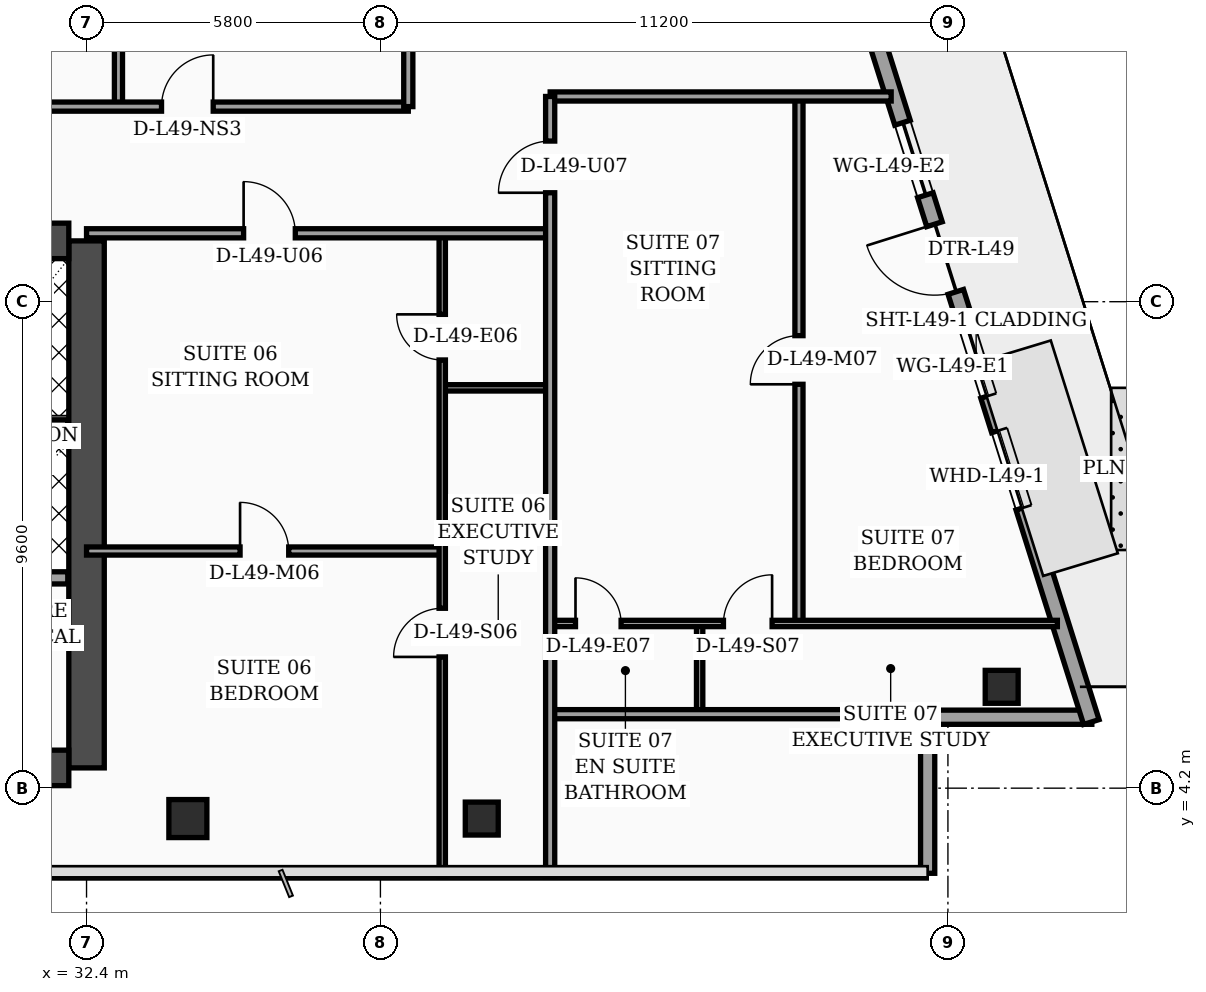
"""IFC4 building model, lengths in metres.
Left out: names, types, materials, properties, quantities, classifications, styles, units other than length and angle.
Written with IfcOpenShell. Run it as: python <this file> out.ifc"""

import sys

from ifc_helpers import new_model, si_unit, direction, frame, frame_2d, origin, origin_2d, place, context, subcontext, project, spatial, rectangle, hollow_rectangle, extrude, element, fill, save


model = new_model("IFC4")
c1 = context("Model", 3, precision=1e-05, world=origin(), true_north=direction((0.0, 1.0)))
c2 = subcontext(c1, "Body", "Model", "MODEL_VIEW")
j1 = project(units=[si_unit("LENGTHUNIT", "METRE"), si_unit("PLANEANGLEUNIT", "RADIAN")], contexts=[c1])
p1 = place(None, origin())
s1 = spatial("IfcSite", under=j1, at=p1, CompositionType="ELEMENT")
p2 = place(p1, origin())
s2 = spatial("IfcBuilding", under=s1, at=p2, CompositionType="ELEMENT")
p3 = place(p2, frame((0.0, 0.0, 199.6)))
s3 = spatial("IfcBuildingStorey", under=s2, at=p3, CompositionType="ELEMENT", Elevation=199.6)
p4 = place(p3, frame((32.4, 4.6, 0.0), z_axis=(0.0, 0.0, 1.0), x_axis=(0.0, 1.0, 0.0)))
e1 = element("IfcWall", 1, at=p4, inside=s3, PredefinedType="SHEAR", context=c2, shape_type="SweptSolid", body=[
    extrude(rectangle(XDim=10.4, YDim=0.7, at=frame_2d((5.2, 0.0))), origin(), (0.0, 0.0, 1.0), 3.56),
])
p5 = place(p3, frame((21.95, 15.0, 0.0), z_axis=(0.0, 0.0, 1.0), x_axis=(1.0, 0.0, 0.0)))
e2 = element("IfcWall", 2, at=p5, inside=s3, PredefinedType="SHEAR", context=c2, shape_type="SweptSolid", body=[
    extrude(rectangle(XDim=10.1, YDim=0.7, at=frame_2d((5.05, 0.0))), origin(), (0.0, 0.0, 1.0), 3.56),
])
p6 = place(p5, frame((4.95, 0.0, 0.0)))
e3 = element("IfcOpeningElement", 3, at=p6, cuts=e2, PredefinedType="OPENING", context=c2, shape_type="SweptSolid", body=[
    extrude(rectangle(XDim=1.1, YDim=2.2, at=frame_2d((0.55, 1.1))), frame((0.0, 0.36, 0.0), z_axis=(0.0, -1.0, 0.0), x_axis=(1.0, 0.0, 0.0)), (0.0, 0.0, 1.0), 0.72),
])
p7 = place(p3, frame((21.95, 4.6, 0.0), z_axis=(0.0, 0.0, 1.0), x_axis=(1.0, 0.0, 0.0)))
e4 = element("IfcWall", 4, at=p7, inside=s3, PredefinedType="SHEAR", context=c2, shape_type="SweptSolid", body=[
    extrude(rectangle(XDim=10.1, YDim=0.7, at=frame_2d((5.05, 0.0))), origin(), (0.0, 0.0, 1.0), 3.56),
])
p8 = place(p3, frame((34.4, 3.6, 0.0), z_axis=(0.0, 0.0, 1.0), x_axis=(1.0, 0.0, 0.0)))
e5 = element("IfcColumn", 5, at=p8, inside=s3, PredefinedType="COLUMN", context=c2, shape_type="SweptSolid", body=[
    extrude(hollow_rectangle(XDim=0.75, YDim=0.75, WallThickness=0.032, at=origin_2d()), origin(), (0.0, 0.0, 1.0), 3.56),
])
for number, where, z_axis, x_axis in (
    (6, (40.2, 3.6, 0.0), (0.0, 0.0, 1.0), (1.0, 0.0, 0.0)),
    (7, (50.461, 6.2, 0.0), (0.0, 0.0, 1.0), (1.0, 0.0, 0.0)),
):
    element("IfcColumn", number, at=place(p3, frame(where, z_axis=z_axis, x_axis=x_axis)), inside=s3, PredefinedType="COLUMN", context=c2, shape_type="SweptSolid", body=[
        extrude(hollow_rectangle(XDim=0.65, YDim=0.65, WallThickness=0.028, at=origin_2d()), origin(), (0.0, 0.0, 1.0), 3.56),
    ])
p9 = place(p3, frame((49.0, 2.52, 0.0), z_axis=(0.0, 0.0, 1.0), x_axis=(0.0, 1.0, 0.0)))
e8 = element("IfcWall", 8, at=p9, inside=s3, PredefinedType="SOLIDWALL", context=c2, shape_type="SweptSolid", body=[
    extrude(rectangle(XDim=2.94, YDim=0.28, at=frame_2d((1.47, 0.0))), origin(), (0.0, 0.0, 1.0), 3.09),
])
p10 = place(p3, frame((48.86, 5.6, 0.0), z_axis=(0.0, 0.0, 1.0), x_axis=(1.0, 0.0, 0.0)))
e9 = element("IfcWall", 9, at=p10, inside=s3, PredefinedType="SOLIDWALL", context=c2, shape_type="SweptSolid", body=[
    extrude(rectangle(XDim=3.38, YDim=0.28, at=frame_2d((1.69, 0.0))), origin(), (0.0, 0.0, 1.0), 3.09),
])
p11 = place(p3, frame((52.23, 5.505, 0.0), z_axis=(0.0, 0.0, 1.0), x_axis=(-0.300509063924, 0.953778958931, 0.0)))
e10 = element("IfcWall", 10, at=p11, inside=s3, PredefinedType="SOLIDWALL", context=c2, shape_type="SweptSolid", body=[
    extrude(rectangle(XDim=30.814, YDim=0.32, at=frame_2d((15.407, 0.0))), origin(), (0.0, 0.0, 1.0), 3.56),
])
p12 = place(p11, frame((8.9, 0.0, 0.0)))
e11 = element("IfcOpeningElement", 11, at=p12, cuts=e10, PredefinedType="OPENING", context=c2, shape_type="SweptSolid", body=[
    extrude(rectangle(XDim=1.4, YDim=2.25, at=frame_2d((0.7, 1.125))), frame((0.0, 0.17, 0.0), z_axis=(0.0, -1.0, 0.0), x_axis=(1.0, 0.0, 0.0)), (0.0, 0.0, 1.0), 0.34),
])
p13 = place(p11, frame((4.437, 0.0, 0.7)))
e12 = element("IfcOpeningElement", 12, at=p13, cuts=e10, PredefinedType="OPENING", context=c2, shape_type="SweptSolid", body=[
    extrude(rectangle(XDim=1.6, YDim=1.65, at=frame_2d((0.8, 0.825))), frame((0.0, 0.17, 0.0), z_axis=(0.0, -1.0, 0.0), x_axis=(1.0, 0.0, 0.0)), (0.0, 0.0, 1.0), 0.34),
])
p14 = place(p11, frame((18.696, 0.0, 0.7)))
e13 = element("IfcOpeningElement", 13, at=p14, cuts=e10, PredefinedType="OPENING", context=c2, shape_type="SweptSolid", body=[
    extrude(rectangle(XDim=1.6, YDim=1.65, at=frame_2d((0.8, 0.825))), frame((0.0, 0.17, 0.0), z_axis=(0.0, -1.0, 0.0), x_axis=(1.0, 0.0, 0.0)), (0.0, 0.0, 1.0), 0.34),
])
p15 = place(p11, frame((6.75, 0.0, 0.75)))
e14 = element("IfcOpeningElement", 14, at=p15, cuts=e10, PredefinedType="OPENING", context=c2, shape_type="SweptSolid", body=[
    extrude(rectangle(XDim=1.5, YDim=1.6, at=frame_2d((0.75, 0.8))), frame((0.0, 0.17, 0.0), z_axis=(0.0, -1.0, 0.0), x_axis=(1.0, 0.0, 0.0)), (0.0, 0.0, 1.0), 0.34),
])
p16 = place(p11, frame((10.9, 0.0, 0.75)))
e15 = element("IfcOpeningElement", 15, at=p16, cuts=e10, PredefinedType="OPENING", context=c2, shape_type="SweptSolid", body=[
    extrude(rectangle(XDim=1.5, YDim=1.6, at=frame_2d((0.75, 0.8))), frame((0.0, 0.17, 0.0), z_axis=(0.0, -1.0, 0.0), x_axis=(1.0, 0.0, 0.0)), (0.0, 0.0, 1.0), 0.34),
])
p17 = place(p11, frame((14.0, 0.0, 0.75)))
e16 = element("IfcOpeningElement", 16, at=p17, cuts=e10, PredefinedType="OPENING", context=c2, shape_type="SweptSolid", body=[
    extrude(rectangle(XDim=1.5, YDim=1.6, at=frame_2d((0.75, 0.8))), frame((0.0, 0.17, 0.0), z_axis=(0.0, -1.0, 0.0), x_axis=(1.0, 0.0, 0.0)), (0.0, 0.0, 1.0), 0.34),
])
p18 = place(p11, frame((16.55, 0.0, 0.75)))
e17 = element("IfcOpeningElement", 17, at=p18, cuts=e10, PredefinedType="OPENING", context=c2, shape_type="SweptSolid", body=[
    extrude(rectangle(XDim=1.5, YDim=1.6, at=frame_2d((0.75, 0.8))), frame((0.0, 0.17, 0.0), z_axis=(0.0, -1.0, 0.0), x_axis=(1.0, 0.0, 0.0)), (0.0, 0.0, 1.0), 0.34),
])
p19 = place(p11, frame((20.75, 0.0, 0.75)))
e18 = element("IfcOpeningElement", 18, at=p19, cuts=e10, PredefinedType="OPENING", context=c2, shape_type="SweptSolid", body=[
    extrude(rectangle(XDim=1.5, YDim=1.6, at=frame_2d((0.75, 0.8))), frame((0.0, 0.17, 0.0), z_axis=(0.0, -1.0, 0.0), x_axis=(1.0, 0.0, 0.0)), (0.0, 0.0, 1.0), 0.34),
])
p20 = place(p11, frame((23.3, 0.0, 0.75)))
e19 = element("IfcOpeningElement", 19, at=p20, cuts=e10, PredefinedType="OPENING", context=c2, shape_type="SweptSolid", body=[
    extrude(rectangle(XDim=1.5, YDim=1.6, at=frame_2d((0.75, 0.8))), frame((0.0, 0.17, 0.0), z_axis=(0.0, -1.0, 0.0), x_axis=(1.0, 0.0, 0.0)), (0.0, 0.0, 1.0), 0.34),
])
p21 = place(p11, frame((26.4, 0.0, 0.75)))
e20 = element("IfcOpeningElement", 20, at=p21, cuts=e10, PredefinedType="OPENING", context=c2, shape_type="SweptSolid", body=[
    extrude(rectangle(XDim=1.5, YDim=1.6, at=frame_2d((0.75, 0.8))), frame((0.0, 0.17, 0.0), z_axis=(0.0, -1.0, 0.0), x_axis=(1.0, 0.0, 0.0)), (0.0, 0.0, 1.0), 0.34),
])
p22 = place(p3, frame((27.02, 11.35, 0.0), z_axis=(0.0, 0.0, 1.0), x_axis=(1.0, 0.0, 0.0)))
e21 = element("IfcWall", 21, at=p22, inside=s3, PredefinedType="SOLIDWALL", context=c2, shape_type="SweptSolid", body=[
    extrude(rectangle(XDim=5.01, YDim=0.24, at=frame_2d((2.505, 0.0))), origin(), (0.0, 0.0, 1.0), 3.56),
])
p23 = place(p22, frame((0.45, 0.0, 0.0)))
e22 = element("IfcOpeningElement", 22, at=p23, cuts=e21, PredefinedType="OPENING", context=c2, shape_type="SweptSolid", body=[
    extrude(rectangle(XDim=1.3, YDim=2.35, at=frame_2d((0.65, 1.175))), frame((0.0, 0.13, 0.0), z_axis=(0.0, -1.0, 0.0), x_axis=(1.0, 0.0, 0.0)), (0.0, 0.0, 1.0), 0.26),
])
p24 = place(p3, frame((27.02, 8.35, 0.0), z_axis=(0.0, 0.0, 1.0), x_axis=(1.0, 0.0, 0.0)))
e23 = element("IfcWall", 23, at=p24, inside=s3, PredefinedType="SOLIDWALL", context=c2, shape_type="SweptSolid", body=[
    extrude(rectangle(XDim=5.01, YDim=0.24, at=frame_2d((2.505, 0.0))), origin(), (0.0, 0.0, 1.0), 3.56),
])
p25 = place(p3, frame((39.42, 12.1, 0.0), z_axis=(0.0, 0.0, 1.0), x_axis=(1.0, 0.0, 0.0)))
e24 = element("IfcWall", 24, at=p25, inside=s3, PredefinedType="PARTITIONING", context=c2, shape_type="SweptSolid", body=[
    extrude(rectangle(XDim=2.13, YDim=0.125, at=frame_2d((1.065, 0.0))), origin(), (0.0, 0.0, 1.0), 3.56),
])
p26 = place(p3, frame((32.4, 8.88, 0.0), z_axis=(0.0, 0.0, 1.0), x_axis=(1.0, 0.0, 0.0)))
e25 = element("IfcWall", 25, at=p26, inside=s3, PredefinedType="PARTITIONING", context=c2, shape_type="SweptSolid", body=[
    extrude(rectangle(XDim=7.02, YDim=0.16, at=frame_2d((3.51, 0.0))), origin(), (0.0, 0.0, 1.0), 2.94),
])
p27 = place(p26, frame((3.03, 0.0, 0.0)))
e26 = element("IfcOpeningElement", 26, at=p27, cuts=e25, PredefinedType="OPENING", context=c2, shape_type="SweptSolid", body=[
    extrude(rectangle(XDim=0.96, YDim=2.2, at=frame_2d((0.48, 1.1))), frame((0.0, 0.09, 0.0), z_axis=(0.0, -1.0, 0.0), x_axis=(1.0, 0.0, 0.0)), (0.0, 0.0, 1.0), 0.18),
])
p28 = place(p3, frame((39.42, 2.44, 0.0), z_axis=(0.0, 0.0, 1.0), x_axis=(0.0, 1.0, 0.0)))
e27 = element("IfcWall", 27, at=p28, inside=s3, PredefinedType="PARTITIONING", context=c2, shape_type="SweptSolid", body=[
    extrude(rectangle(XDim=12.71, YDim=0.125, at=frame_2d((6.355, 0.0))), origin(), (0.0, 0.0, 1.0), 2.94),
])
p29 = place(p28, frame((4.35, 0.0, 0.0)))
e28 = element("IfcOpeningElement", 28, at=p29, cuts=e27, PredefinedType="OPENING", context=c2, shape_type="SweptSolid", body=[
    extrude(rectangle(XDim=0.96, YDim=2.2, at=frame_2d((0.48, 1.1))), frame((0.0, 0.073, 0.0), z_axis=(0.0, -1.0, 0.0), x_axis=(1.0, 0.0, 0.0)), (0.0, 0.0, 1.0), 0.145),
])
p30 = place(p28, frame((10.21, 0.0, 0.0)))
e29 = element("IfcOpeningElement", 29, at=p30, cuts=e27, PredefinedType="OPENING", context=c2, shape_type="SweptSolid", body=[
    extrude(rectangle(XDim=0.9, YDim=2.15, at=frame_2d((0.45, 1.075))), frame((0.0, 0.073, 0.0), z_axis=(0.0, -1.0, 0.0), x_axis=(1.0, 0.0, 0.0)), (0.0, 0.0, 1.0), 0.145),
])
p31 = place(p3, frame((32.4, 15.15, 0.0), z_axis=(0.0, 0.0, 1.0), x_axis=(1.0, 0.0, 0.0)))
e30 = element("IfcWall", 30, at=p31, inside=s3, PredefinedType="PARTITIONING", context=c2, shape_type="SweptSolid", body=[
    extrude(rectangle(XDim=9.15, YDim=0.18, at=frame_2d((4.575, 0.0))), origin(), (0.0, 0.0, 1.0), 2.94),
])
p32 = place(p31, frame((3.1, 0.0, 0.0)))
e31 = element("IfcOpeningElement", 31, at=p32, cuts=e30, PredefinedType="OPENING", context=c2, shape_type="SweptSolid", body=[
    extrude(rectangle(XDim=1.02, YDim=2.2, at=frame_2d((0.51, 1.1))), frame((0.0, 0.1, 0.0), z_axis=(0.0, -1.0, 0.0), x_axis=(1.0, 0.0, 0.0)), (0.0, 0.0, 1.0), 0.2),
])
p33 = place(p3, frame((33.03, 17.65, 0.0), z_axis=(0.0, 0.0, 1.0), x_axis=(0.0, 1.0, 0.0)))
e32 = element("IfcWall", 32, at=p33, inside=s3, PredefinedType="PARTITIONING", context=c2, shape_type="SweptSolid", body=[
    extrude(rectangle(XDim=15.76, YDim=0.16, at=frame_2d((7.88, 0.0))), origin(), (0.0, 0.0, 1.0), 2.94),
])
p34 = place(p3, frame((21.5, 17.65, 0.0), z_axis=(0.0, 0.0, 1.0), x_axis=(1.0, 0.0, 0.0)))
e33 = element("IfcWall", 33, at=p34, inside=s3, PredefinedType="PARTITIONING", context=c2, shape_type="SweptSolid", body=[
    extrude(rectangle(XDim=17.25, YDim=0.18, at=frame_2d((8.625, 0.0))), origin(), (0.0, 0.0, 1.0), 2.94),
])
p35 = place(p34, frame((0.95, 0.0, 0.0)))
e34 = element("IfcOpeningElement", 34, at=p35, cuts=e33, PredefinedType="OPENING", context=c2, shape_type="SweptSolid", body=[
    extrude(rectangle(XDim=1.02, YDim=2.2, at=frame_2d((0.51, 1.1))), frame((0.0, 0.1, 0.0), z_axis=(0.0, -1.0, 0.0), x_axis=(1.0, 0.0, 0.0)), (0.0, 0.0, 1.0), 0.2),
])
p36 = place(p34, frame((6.67, 0.0, 0.0)))
e35 = element("IfcOpeningElement", 35, at=p36, cuts=e33, PredefinedType="OPENING", context=c2, shape_type="SweptSolid", body=[
    extrude(rectangle(XDim=1.02, YDim=2.2, at=frame_2d((0.51, 1.1))), frame((0.0, 0.1, 0.0), z_axis=(0.0, -1.0, 0.0), x_axis=(1.0, 0.0, 0.0)), (0.0, 0.0, 1.0), 0.2),
])
p37 = place(p34, frame((12.38, 0.0, 0.0)))
e36 = element("IfcOpeningElement", 36, at=p37, cuts=e33, PredefinedType="OPENING", context=c2, shape_type="SweptSolid", body=[
    extrude(rectangle(XDim=1.02, YDim=2.2, at=frame_2d((0.51, 1.1))), frame((0.0, 0.1, 0.0), z_axis=(0.0, -1.0, 0.0), x_axis=(1.0, 0.0, 0.0)), (0.0, 0.0, 1.0), 0.2),
])
p38 = place(p3, frame((38.75, 17.65, 0.0), z_axis=(0.0, 0.0, 1.0), x_axis=(0.0, 1.0, 0.0)))
e37 = element("IfcWall", 37, at=p38, inside=s3, PredefinedType="PARTITIONING", context=c2, shape_type="SweptSolid", body=[
    extrude(rectangle(XDim=20.23, YDim=0.18, at=frame_2d((10.115, 0.0))), origin(), (0.0, 0.0, 1.0), 2.94),
])
p39 = place(p3, frame((44.5, 5.66, 0.0), z_axis=(0.0, 0.0, 1.0), x_axis=(0.0, 1.0, 0.0)))
e38 = element("IfcWall", 38, at=p39, inside=s3, PredefinedType="PARTITIONING", context=c2, shape_type="SweptSolid", body=[
    extrude(rectangle(XDim=1.79, YDim=0.125, at=frame_2d((0.895, 0.0))), origin(), (0.0, 0.0, 1.0), 3.56),
])
p40 = place(p3, frame((46.46, 7.45, 0.0), z_axis=(0.0, 0.0, 1.0), x_axis=(0.0, 1.0, 0.0)))
e39 = element("IfcWall", 39, at=p40, inside=s3, PredefinedType="PARTITIONING", context=c2, shape_type="SweptSolid", body=[
    extrude(rectangle(XDim=10.4, YDim=0.16, at=frame_2d((5.2, 0.0))), origin(), (0.0, 0.0, 1.0), 3.09),
])
p41 = place(p40, frame((4.72, 0.0, 0.0)))
e40 = element("IfcOpeningElement", 40, at=p41, cuts=e39, PredefinedType="OPENING", context=c2, shape_type="SweptSolid", body=[
    extrude(rectangle(XDim=0.96, YDim=2.2, at=frame_2d((0.48, 1.1))), frame((0.0, 0.09, 0.0), z_axis=(0.0, -1.0, 0.0), x_axis=(1.0, 0.0, 0.0)), (0.0, 0.0, 1.0), 0.18),
])
p42 = place(p3, frame((41.55, 7.45, 0.0), z_axis=(0.0, 0.0, 1.0), x_axis=(1.0, 0.0, 0.0)))
e41 = element("IfcWall", 41, at=p42, inside=s3, PredefinedType="PARTITIONING", context=c2, shape_type="SweptSolid", body=[
    extrude(rectangle(XDim=10.01, YDim=0.125, at=frame_2d((5.005, 0.0))), origin(), (0.0, 0.0, 1.0), 3.09),
])
p43 = place(p42, frame((0.5, 0.0, 0.0)))
e42 = element("IfcOpeningElement", 42, at=p43, cuts=e41, PredefinedType="OPENING", context=c2, shape_type="SweptSolid", body=[
    extrude(rectangle(XDim=0.9, YDim=2.15, at=frame_2d((0.45, 1.075))), frame((0.0, 0.073, 0.0), z_axis=(0.0, -1.0, 0.0), x_axis=(1.0, 0.0, 0.0)), (0.0, 0.0, 1.0), 0.145),
])
p44 = place(p42, frame((3.42, 0.0, 0.0)))
e43 = element("IfcOpeningElement", 43, at=p44, cuts=e41, PredefinedType="OPENING", context=c2, shape_type="SweptSolid", body=[
    extrude(rectangle(XDim=0.96, YDim=2.2, at=frame_2d((0.48, 1.1))), frame((0.0, 0.073, 0.0), z_axis=(0.0, -1.0, 0.0), x_axis=(1.0, 0.0, 0.0)), (0.0, 0.0, 1.0), 0.145),
])
p45 = place(p3, frame((41.55, 5.66, 0.0), z_axis=(0.0, 0.0, 1.0), x_axis=(1.0, 0.0, 0.0)))
e44 = element("IfcWall", 44, at=p45, inside=s3, PredefinedType="PARTITIONING", context=c2, shape_type="SweptSolid", body=[
    extrude(rectangle(XDim=7.45, YDim=0.18, at=frame_2d((3.725, 0.0))), origin(), (0.0, 0.0, 1.0), 3.09),
])
p46 = place(p3, frame((41.55, 17.85, 0.0), z_axis=(0.0, 0.0, 1.0), x_axis=(1.0, 0.0, 0.0)))
e45 = element("IfcWall", 45, at=p46, inside=s3, PredefinedType="PARTITIONING", context=c2, shape_type="SweptSolid", body=[
    extrude(rectangle(XDim=6.73, YDim=0.18, at=frame_2d((3.365, 0.0))), origin(), (0.0, 0.0, 1.0), 2.94),
])
p47 = place(p3, frame((41.55, 2.44, 0.0), z_axis=(0.0, 0.0, 1.0), x_axis=(0.0, 1.0, 0.0)))
e46 = element("IfcWall", 46, at=p47, inside=s3, PredefinedType="PARTITIONING", context=c2, shape_type="SweptSolid", body=[
    extrude(rectangle(XDim=15.41, YDim=0.18, at=frame_2d((7.705, 0.0))), origin(), (0.0, 0.0, 1.0), 2.94),
])
p48 = place(p47, frame((13.51, 0.0, 0.0)))
e47 = element("IfcOpeningElement", 47, at=p48, cuts=e46, PredefinedType="OPENING", context=c2, shape_type="SweptSolid", body=[
    extrude(rectangle(XDim=1.02, YDim=2.2, at=frame_2d((0.51, 1.1))), frame((0.0, 0.1, 0.0), z_axis=(0.0, -1.0, 0.0), x_axis=(1.0, 0.0, 0.0)), (0.0, 0.0, 1.0), 0.2),
])
p49 = place(p12, origin())
e48 = element("IfcDoor", 48, at=p49, inside=s3, OperationType="SINGLE_SWING_RIGHT", PredefinedType="DOOR", context=c2, shape_type="SweptSolid", body=[
    extrude(rectangle(XDim=1.4, YDim=2.25, at=frame_2d((0.7, 1.125))), frame((0.0, 0.025, 0.0), z_axis=(0.0, -1.0, 0.0), x_axis=(1.0, 0.0, 0.0)), (0.0, 0.0, 1.0), 0.05),
])
fill(e11, e48)
p50 = place(p13, origin())
e49 = element("IfcWindow", 49, at=p50, inside=s3, PartitioningType="SINGLE_PANEL", PredefinedType="WINDOW", context=c2, shape_type="SweptSolid", body=[
    extrude(rectangle(XDim=1.6, YDim=1.65, at=frame_2d((0.8, 0.825))), frame((0.0, 0.03, 0.0), z_axis=(0.0, -1.0, 0.0), x_axis=(1.0, 0.0, 0.0)), (0.0, 0.0, 1.0), 0.06),
])
fill(e12, e49)
p51 = place(p15, origin())
e50 = element("IfcWindow", 50, at=p51, inside=s3, PartitioningType="SINGLE_PANEL", PredefinedType="WINDOW", context=c2, shape_type="SweptSolid", body=[
    extrude(rectangle(XDim=1.5, YDim=1.6, at=frame_2d((0.75, 0.8))), frame((0.0, 0.03, 0.0), z_axis=(0.0, -1.0, 0.0), x_axis=(1.0, 0.0, 0.0)), (0.0, 0.0, 1.0), 0.06),
])
fill(e14, e50)
p52 = place(p16, origin())
e51 = element("IfcWindow", 51, at=p52, inside=s3, PartitioningType="SINGLE_PANEL", PredefinedType="WINDOW", context=c2, shape_type="SweptSolid", body=[
    extrude(rectangle(XDim=1.5, YDim=1.6, at=frame_2d((0.75, 0.8))), frame((0.0, 0.03, 0.0), z_axis=(0.0, -1.0, 0.0), x_axis=(1.0, 0.0, 0.0)), (0.0, 0.0, 1.0), 0.06),
])
fill(e15, e51)
p53 = place(p27, origin())
e52 = element("IfcDoor", 52, at=p53, inside=s3, OperationType="SINGLE_SWING_LEFT", PredefinedType="DOOR", context=c2, shape_type="SweptSolid", body=[
    extrude(rectangle(XDim=0.96, YDim=2.2, at=frame_2d((0.48, 1.1))), frame((0.0, 0.025, 0.0), z_axis=(0.0, -1.0, 0.0), x_axis=(1.0, 0.0, 0.0)), (0.0, 0.0, 1.0), 0.05),
])
fill(e26, e52)
p54 = place(p29, origin())
e53 = element("IfcDoor", 53, at=p54, inside=s3, OperationType="SINGLE_SWING_LEFT", PredefinedType="DOOR", context=c2, shape_type="SweptSolid", body=[
    extrude(rectangle(XDim=0.96, YDim=2.2, at=frame_2d((0.48, 1.1))), frame((0.0, 0.025, 0.0), z_axis=(0.0, -1.0, 0.0), x_axis=(1.0, 0.0, 0.0)), (0.0, 0.0, 1.0), 0.05),
])
fill(e28, e53)
p55 = place(p30, origin())
e54 = element("IfcDoor", 54, at=p55, inside=s3, OperationType="SINGLE_SWING_RIGHT", PredefinedType="DOOR", context=c2, shape_type="SweptSolid", body=[
    extrude(rectangle(XDim=0.9, YDim=2.15, at=frame_2d((0.45, 1.075))), frame((0.0, 0.025, 0.0), z_axis=(0.0, -1.0, 0.0), x_axis=(1.0, 0.0, 0.0)), (0.0, 0.0, 1.0), 0.05),
])
fill(e29, e54)
p56 = place(p32, origin())
e55 = element("IfcDoor", 55, at=p56, inside=s3, OperationType="SINGLE_SWING_LEFT", PredefinedType="DOOR", context=c2, shape_type="SweptSolid", body=[
    extrude(rectangle(XDim=1.02, YDim=2.2, at=frame_2d((0.51, 1.1))), frame((0.0, 0.025, 0.0), z_axis=(0.0, -1.0, 0.0), x_axis=(1.0, 0.0, 0.0)), (0.0, 0.0, 1.0), 0.05),
])
fill(e31, e55)
p57 = place(p37, origin())
e56 = element("IfcDoor", 56, at=p57, inside=s3, OperationType="SINGLE_SWING_RIGHT", PredefinedType="DOOR", context=c2, shape_type="SweptSolid", body=[
    extrude(rectangle(XDim=1.02, YDim=2.2, at=frame_2d((0.51, 1.1))), frame((0.0, 0.025, 0.0), z_axis=(0.0, -1.0, 0.0), x_axis=(1.0, 0.0, 0.0)), (0.0, 0.0, 1.0), 0.05),
])
fill(e36, e56)
p58 = place(p41, origin())
e57 = element("IfcDoor", 57, at=p58, inside=s3, OperationType="SINGLE_SWING_LEFT", PredefinedType="DOOR", context=c2, shape_type="SweptSolid", body=[
    extrude(rectangle(XDim=0.96, YDim=2.2, at=frame_2d((0.48, 1.1))), frame((0.0, 0.025, 0.0), z_axis=(0.0, -1.0, 0.0), x_axis=(1.0, 0.0, 0.0)), (0.0, 0.0, 1.0), 0.05),
])
fill(e40, e57)
p59 = place(p43, origin())
e58 = element("IfcDoor", 58, at=p59, inside=s3, OperationType="SINGLE_SWING_LEFT", PredefinedType="DOOR", context=c2, shape_type="SweptSolid", body=[
    extrude(rectangle(XDim=0.9, YDim=2.15, at=frame_2d((0.45, 1.075))), frame((0.0, 0.025, 0.0), z_axis=(0.0, -1.0, 0.0), x_axis=(1.0, 0.0, 0.0)), (0.0, 0.0, 1.0), 0.05),
])
fill(e42, e58)
p60 = place(p44, origin())
e59 = element("IfcDoor", 59, at=p60, inside=s3, OperationType="SINGLE_SWING_RIGHT", PredefinedType="DOOR", context=c2, shape_type="SweptSolid", body=[
    extrude(rectangle(XDim=0.96, YDim=2.2, at=frame_2d((0.48, 1.1))), frame((0.0, 0.025, 0.0), z_axis=(0.0, -1.0, 0.0), x_axis=(1.0, 0.0, 0.0)), (0.0, 0.0, 1.0), 0.05),
])
fill(e43, e59)
p61 = place(p48, origin())
e60 = element("IfcDoor", 60, at=p61, inside=s3, OperationType="SINGLE_SWING_LEFT", PredefinedType="DOOR", context=c2, shape_type="SweptSolid", body=[
    extrude(rectangle(XDim=1.02, YDim=2.2, at=frame_2d((0.51, 1.1))), frame((0.0, 0.025, 0.0), z_axis=(0.0, -1.0, 0.0), x_axis=(1.0, 0.0, 0.0)), (0.0, 0.0, 1.0), 0.05),
])
fill(e47, e60)
save(model, sys.argv[1])
